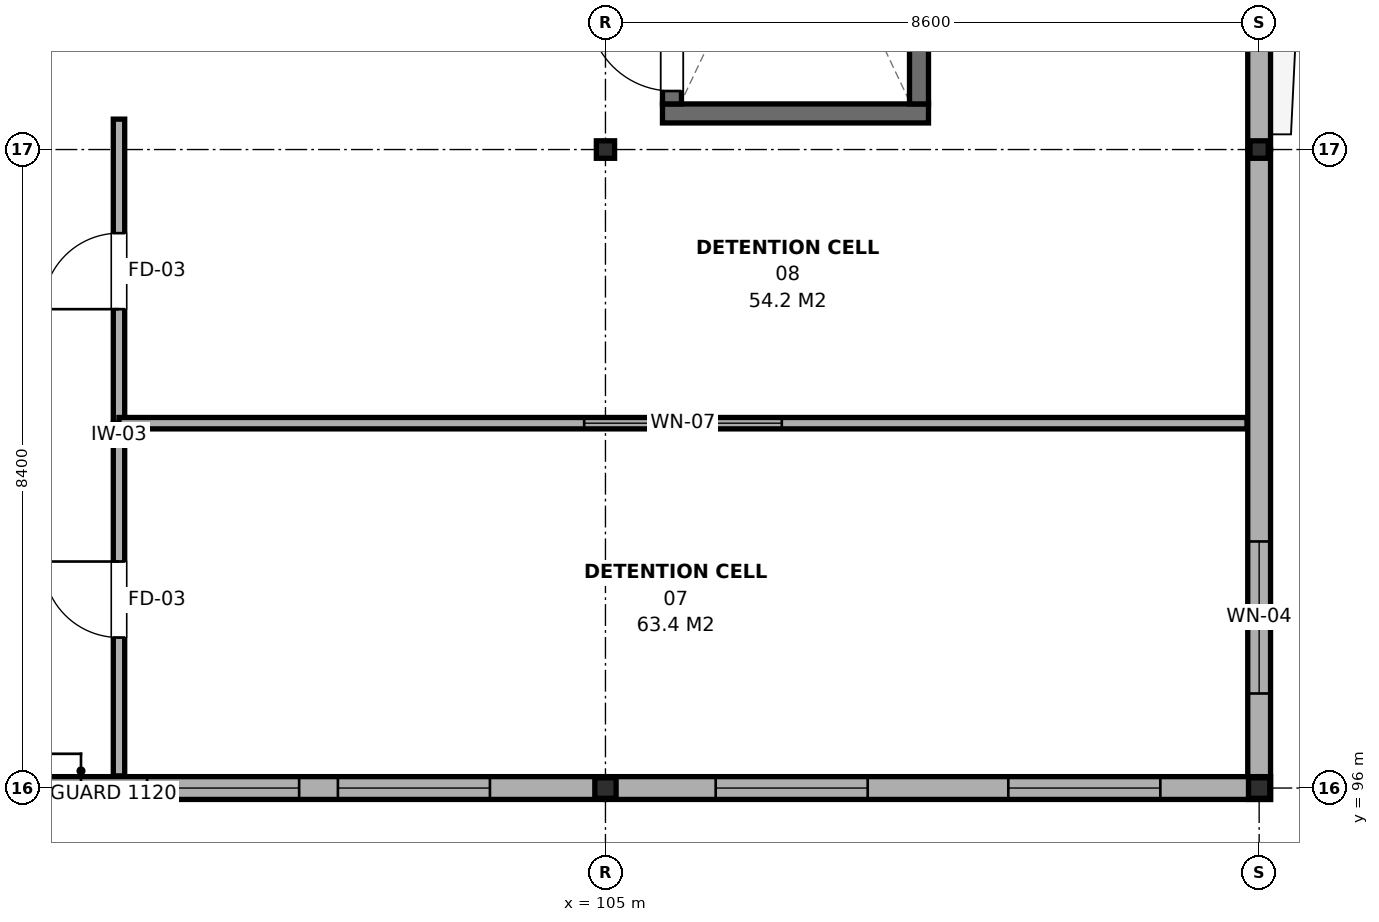
"""IFC4 building model, lengths in metres.
Left out: names, types, materials, properties, quantities, classifications, styles, units other than length and angle.
Written with IfcOpenShell. Run it as: python <this file> out.ifc"""

import sys

from ifc_helpers import new_model, si_unit, direction, frame, frame_2d, origin, origin_2d, place, context, subcontext, project, spatial, rectangle, i_section, extrude, element, fill, save


model = new_model("IFC4")
c1 = context("Model", 3, precision=1e-05, world=origin(), true_north=direction((0.0, 1.0)))
c2 = subcontext(c1, "Body", "Model", "MODEL_VIEW")
j1 = project(units=[si_unit("LENGTHUNIT", "METRE"), si_unit("PLANEANGLEUNIT", "RADIAN")], contexts=[c1])
p1 = place(None, origin())
s1 = spatial("IfcSite", under=j1, at=p1, CompositionType="ELEMENT")
p2 = place(p1, origin())
s2 = spatial("IfcBuilding", under=s1, at=p2, CompositionType="ELEMENT")
p3 = place(p2, frame((0.0, 0.0, 9.0)))
s3 = spatial("IfcBuildingStorey", under=s2, at=p3, CompositionType="ELEMENT", Elevation=9.0)
p4 = place(p3, frame((105.0, 96.0, 0.0), z_axis=(0.0, 0.0, 1.0), x_axis=(1.0, 0.0, 0.0)))
e1 = element("IfcColumn", 1, at=p4, inside=s3, PredefinedType="COLUMN", context=c2, shape_type="SweptSolid", body=[
    extrude(i_section(OverallWidth=0.28, OverallDepth=0.27, WebThickness=0.008, FlangeThickness=0.013, FilletRadius=0.024, at=origin_2d()), origin(), (0.0, 0.0, 1.0), 3.98),
])
p5 = place(p3, frame((105.0, 104.4, 0.0), z_axis=(0.0, 0.0, 1.0), x_axis=(1.0, 0.0, 0.0)))
e2 = element("IfcColumn", 2, at=p5, inside=s3, PredefinedType="COLUMN", context=c2, shape_type="SweptSolid", body=[
    extrude(i_section(OverallWidth=0.24, OverallDepth=0.23, WebThickness=0.008, FlangeThickness=0.012, FilletRadius=0.021, at=origin_2d()), origin(), (0.0, 0.0, 1.0), 3.98),
])
p6 = place(p3, frame((113.6, 96.0, 0.0), z_axis=(0.0, 0.0, 1.0), x_axis=(1.0, 0.0, 0.0)))
e3 = element("IfcColumn", 3, at=p6, inside=s3, PredefinedType="COLUMN", context=c2, shape_type="SweptSolid", body=[
    extrude(i_section(OverallWidth=0.28, OverallDepth=0.27, WebThickness=0.008, FlangeThickness=0.013, FilletRadius=0.024, at=origin_2d()), origin(), (0.0, 0.0, 1.0), 3.98),
])
p7 = place(p3, frame((113.6, 104.4, 0.0), z_axis=(0.0, 0.0, 1.0), x_axis=(1.0, 0.0, 0.0)))
e4 = element("IfcColumn", 4, at=p7, inside=s3, PredefinedType="COLUMN", context=c2, shape_type="SweptSolid", body=[
    extrude(i_section(OverallWidth=0.24, OverallDepth=0.23, WebThickness=0.008, FlangeThickness=0.012, FilletRadius=0.021, at=origin_2d()), origin(), (0.0, 0.0, 1.0), 3.98),
])
p8 = place(p3, frame((105.75, 104.875, 0.0), z_axis=(0.0, 0.0, 1.0), x_axis=(1.0, 0.0, 0.0)))
e5 = element("IfcWall", 5, at=p8, inside=s3, PredefinedType="SHEAR", context=c2, shape_type="SweptSolid", body=[
    extrude(rectangle(XDim=3.5, YDim=0.25, at=frame_2d((1.75, 0.0))), origin(), (0.0, 0.0, 1.0), 3.98),
])
p9 = place(p3, frame((105.875, 105.0, 0.0), z_axis=(0.0, 0.0, 1.0), x_axis=(0.0, 1.0, 0.0)))
e6 = element("IfcWall", 6, at=p9, inside=s3, PredefinedType="SHEAR", context=c2, shape_type="SweptSolid", body=[
    extrude(rectangle(XDim=6.4, YDim=0.25, at=frame_2d((3.2, 0.0))), origin(), (0.0, 0.0, 1.0), 3.98),
])
p10 = place(p9, frame((0.17, 0.0, 0.0)))
e7 = element("IfcOpeningElement", 7, at=p10, cuts=e6, PredefinedType="OPENING", context=c2, shape_type="SweptSolid", body=[
    extrude(rectangle(XDim=1.1, YDim=2.15, at=frame_2d((0.55, 1.075))), frame((0.0, 0.14, 0.0), z_axis=(0.0, -1.0, 0.0), x_axis=(1.0, 0.0, 0.0)), (0.0, 0.0, 1.0), 0.28),
])
p11 = place(p3, frame((109.125, 105.0, 0.0), z_axis=(0.0, 0.0, 1.0), x_axis=(0.0, 1.0, 0.0)))
e8 = element("IfcWall", 8, at=p11, inside=s3, PredefinedType="SHEAR", context=c2, shape_type="SweptSolid", body=[
    extrude(rectangle(XDim=6.4, YDim=0.25, at=frame_2d((3.2, 0.0))), origin(), (0.0, 0.0, 1.0), 3.98),
])
p12 = place(p3, frame((113.6, 95.85, 0.0), z_axis=(0.0, 0.0, 1.0), x_axis=(0.0, 1.0, 0.0)))
e9 = element("IfcWall", 9, at=p12, inside=s3, PredefinedType="SOLIDWALL", context=c2, shape_type="SweptSolid", body=[
    extrude(rectangle(XDim=8.55, YDim=0.3, at=frame_2d((4.275, 0.0))), origin(), (0.0, 0.0, 1.0), 3.485),
])
p13 = place(p12, frame((1.394, 0.0, 1.1)))
e10 = element("IfcOpeningElement", 10, at=p13, cuts=e9, PredefinedType="OPENING", context=c2, shape_type="SweptSolid", body=[
    extrude(rectangle(XDim=2.0, YDim=1.8, at=frame_2d((1.0, 0.9))), frame((0.0, 0.165, 0.0), z_axis=(0.0, -1.0, 0.0), x_axis=(1.0, 0.0, 0.0)), (0.0, 0.0, 1.0), 0.33),
])
p14 = place(p3, frame((113.6, 104.4, 0.0), z_axis=(0.0, 0.0, 1.0), x_axis=(0.0, 1.0, 0.0)))
e11 = element("IfcWall", 11, at=p14, inside=s3, PredefinedType="SOLIDWALL", context=c2, shape_type="SweptSolid", body=[
    extrude(rectangle(XDim=9.0, YDim=0.3, at=frame_2d((4.5, 0.0))), origin(), (0.0, 0.0, 1.0), 3.485),
])
p15 = place(p14, frame((1.52, 0.0, 1.1)))
e12 = element("IfcOpeningElement", 12, at=p15, cuts=e11, PredefinedType="OPENING", context=c2, shape_type="SweptSolid", body=[
    extrude(rectangle(XDim=2.0, YDim=1.8, at=frame_2d((1.0, 0.9))), frame((0.0, 0.165, 0.0), z_axis=(0.0, -1.0, 0.0), x_axis=(1.0, 0.0, 0.0)), (0.0, 0.0, 1.0), 0.33),
])
p16 = place(p14, frame((5.48, 0.0, 1.1)))
e13 = element("IfcOpeningElement", 13, at=p16, cuts=e11, PredefinedType="OPENING", context=c2, shape_type="SweptSolid", body=[
    extrude(rectangle(XDim=2.0, YDim=1.8, at=frame_2d((1.0, 0.9))), frame((0.0, 0.165, 0.0), z_axis=(0.0, -1.0, 0.0), x_axis=(1.0, 0.0, 0.0)), (0.0, 0.0, 1.0), 0.33),
])
p17 = place(p3, frame((96.0, 96.0, 0.0), z_axis=(0.0, 0.0, 1.0), x_axis=(1.0, 0.0, 0.0)))
e14 = element("IfcWall", 14, at=p17, inside=s3, PredefinedType="SOLIDWALL", context=c2, shape_type="SweptSolid", body=[
    extrude(rectangle(XDim=9.0, YDim=0.3, at=frame_2d((4.5, 0.0))), origin(), (0.0, 0.0, 1.0), 3.435),
])
p18 = place(p17, frame((2.97, 0.0, 0.95)))
e15 = element("IfcOpeningElement", 15, at=p18, cuts=e14, PredefinedType="OPENING", context=c2, shape_type="SweptSolid", body=[
    extrude(rectangle(XDim=2.0, YDim=1.8, at=frame_2d((1.0, 0.9))), frame((0.0, 0.165, 0.0), z_axis=(0.0, -1.0, 0.0), x_axis=(1.0, 0.0, 0.0)), (0.0, 0.0, 1.0), 0.33),
])
p19 = place(p17, frame((5.48, 0.0, 0.95)))
e16 = element("IfcOpeningElement", 16, at=p19, cuts=e14, PredefinedType="OPENING", context=c2, shape_type="SweptSolid", body=[
    extrude(rectangle(XDim=2.0, YDim=1.8, at=frame_2d((1.0, 0.9))), frame((0.0, 0.165, 0.0), z_axis=(0.0, -1.0, 0.0), x_axis=(1.0, 0.0, 0.0)), (0.0, 0.0, 1.0), 0.33),
])
p20 = place(p3, frame((105.0, 96.0, 0.0), z_axis=(0.0, 0.0, 1.0), x_axis=(1.0, 0.0, 0.0)))
e17 = element("IfcWall", 17, at=p20, inside=s3, PredefinedType="SOLIDWALL", context=c2, shape_type="SweptSolid", body=[
    extrude(rectangle(XDim=8.75, YDim=0.3, at=frame_2d((4.375, 0.0))), origin(), (0.0, 0.0, 1.0), 3.485),
])
p21 = place(p20, frame((1.45, 0.0, 0.95)))
e18 = element("IfcOpeningElement", 18, at=p21, cuts=e17, PredefinedType="OPENING", context=c2, shape_type="SweptSolid", body=[
    extrude(rectangle(XDim=2.0, YDim=1.8, at=frame_2d((1.0, 0.9))), frame((0.0, 0.165, 0.0), z_axis=(0.0, -1.0, 0.0), x_axis=(1.0, 0.0, 0.0)), (0.0, 0.0, 1.0), 0.33),
])
p22 = place(p20, frame((5.3, 0.0, 0.95)))
e19 = element("IfcOpeningElement", 19, at=p22, cuts=e17, PredefinedType="OPENING", context=c2, shape_type="SweptSolid", body=[
    extrude(rectangle(XDim=2.0, YDim=1.8, at=frame_2d((1.0, 0.9))), frame((0.0, 0.165, 0.0), z_axis=(0.0, -1.0, 0.0), x_axis=(1.0, 0.0, 0.0)), (0.0, 0.0, 1.0), 0.33),
])
p23 = place(p3, frame((98.6, 96.16, 0.0), z_axis=(0.0, 0.0, 1.0), x_axis=(0.0, 1.0, 0.0)))
e20 = element("IfcWall", 20, at=p23, inside=s3, PredefinedType="PARTITIONING", context=c2, shape_type="SweptSolid", body=[
    extrude(rectangle(XDim=4.64, YDim=0.15, at=frame_2d((2.32, 0.0))), origin(), (0.0, 0.0, 1.0), 3.485),
])
p24 = place(p23, frame((1.82, 0.0, 0.0)))
e21 = element("IfcOpeningElement", 21, at=p24, cuts=e20, PredefinedType="OPENING", context=c2, shape_type="SweptSolid", body=[
    extrude(rectangle(XDim=1.0, YDim=2.15, at=frame_2d((0.5, 1.075))), frame((0.0, 0.09, 0.0), z_axis=(0.0, -1.0, 0.0), x_axis=(1.0, 0.0, 0.0)), (0.0, 0.0, 1.0), 0.18),
])
p25 = place(p3, frame((98.6, 100.8, 0.0), z_axis=(0.0, 0.0, 1.0), x_axis=(0.0, 1.0, 0.0)))
e22 = element("IfcWall", 22, at=p25, inside=s3, PredefinedType="PARTITIONING", context=c2, shape_type="SweptSolid", body=[
    extrude(rectangle(XDim=4.0, YDim=0.15, at=frame_2d((2.0, 0.0))), origin(), (0.0, 0.0, 1.0), 3.585),
])
p26 = place(p25, frame((1.5, 0.0, 0.0)))
e23 = element("IfcOpeningElement", 23, at=p26, cuts=e22, PredefinedType="OPENING", context=c2, shape_type="SweptSolid", body=[
    extrude(rectangle(XDim=1.0, YDim=2.15, at=frame_2d((0.5, 1.075))), frame((0.0, 0.09, 0.0), z_axis=(0.0, -1.0, 0.0), x_axis=(1.0, 0.0, 0.0)), (0.0, 0.0, 1.0), 0.18),
])
p27 = place(p3, frame((98.6, 100.8, 0.0), z_axis=(0.0, 0.0, 1.0), x_axis=(1.0, 0.0, 0.0)))
e24 = element("IfcWall", 24, at=p27, inside=s3, PredefinedType="PARTITIONING", context=c2, shape_type="SweptSolid", body=[
    extrude(rectangle(XDim=14.84, YDim=0.15, at=frame_2d((7.42, 0.0))), origin(), (0.0, 0.0, 1.0), 3.485),
])
p28 = place(p27, frame((6.12, 0.0, 0.95)))
e25 = element("IfcOpeningElement", 25, at=p28, cuts=e24, PredefinedType="OPENING", context=c2, shape_type="SweptSolid", body=[
    extrude(rectangle(XDim=2.6, YDim=1.5, at=frame_2d((1.3, 0.75))), frame((0.0, 0.09, 0.0), z_axis=(0.0, -1.0, 0.0), x_axis=(1.0, 0.0, 0.0)), (0.0, 0.0, 1.0), 0.18),
])
p29 = place(p13, origin())
e26 = element("IfcWindow", 26, at=p29, inside=s3, PartitioningType="SINGLE_PANEL", PredefinedType="WINDOW", context=c2, shape_type="SweptSolid", body=[
    extrude(rectangle(XDim=2.0, YDim=1.8, at=frame_2d((1.0, 0.9))), frame((0.0, 0.03, 0.0), z_axis=(0.0, -1.0, 0.0), x_axis=(1.0, 0.0, 0.0)), (0.0, 0.0, 1.0), 0.06),
])
fill(e10, e26)
p30 = place(p18, origin())
e27 = element("IfcWindow", 27, at=p30, inside=s3, PartitioningType="SINGLE_PANEL", PredefinedType="WINDOW", context=c2, shape_type="SweptSolid", body=[
    extrude(rectangle(XDim=2.0, YDim=1.8, at=frame_2d((1.0, 0.9))), frame((0.0, 0.03, 0.0), z_axis=(0.0, -1.0, 0.0), x_axis=(1.0, 0.0, 0.0)), (0.0, 0.0, 1.0), 0.06),
])
fill(e15, e27)
p31 = place(p19, origin())
e28 = element("IfcWindow", 28, at=p31, inside=s3, PartitioningType="SINGLE_PANEL", PredefinedType="WINDOW", context=c2, shape_type="SweptSolid", body=[
    extrude(rectangle(XDim=2.0, YDim=1.8, at=frame_2d((1.0, 0.9))), frame((0.0, 0.03, 0.0), z_axis=(0.0, -1.0, 0.0), x_axis=(1.0, 0.0, 0.0)), (0.0, 0.0, 1.0), 0.06),
])
fill(e16, e28)
p32 = place(p21, origin())
e29 = element("IfcWindow", 29, at=p32, inside=s3, PartitioningType="SINGLE_PANEL", PredefinedType="WINDOW", context=c2, shape_type="SweptSolid", body=[
    extrude(rectangle(XDim=2.0, YDim=1.8, at=frame_2d((1.0, 0.9))), frame((0.0, 0.03, 0.0), z_axis=(0.0, -1.0, 0.0), x_axis=(1.0, 0.0, 0.0)), (0.0, 0.0, 1.0), 0.06),
])
fill(e18, e29)
p33 = place(p22, origin())
e30 = element("IfcWindow", 30, at=p33, inside=s3, PartitioningType="SINGLE_PANEL", PredefinedType="WINDOW", context=c2, shape_type="SweptSolid", body=[
    extrude(rectangle(XDim=2.0, YDim=1.8, at=frame_2d((1.0, 0.9))), frame((0.0, 0.03, 0.0), z_axis=(0.0, -1.0, 0.0), x_axis=(1.0, 0.0, 0.0)), (0.0, 0.0, 1.0), 0.06),
])
fill(e19, e30)
p34 = place(p10, origin())
e31 = element("IfcDoor", 31, at=p34, inside=s3, OperationType="SINGLE_SWING_RIGHT", PredefinedType="DOOR", context=c2, shape_type="SweptSolid", body=[
    extrude(rectangle(XDim=1.1, YDim=2.15, at=frame_2d((0.55, 1.075))), frame((0.0, 0.025, 0.0), z_axis=(0.0, -1.0, 0.0), x_axis=(1.0, 0.0, 0.0)), (0.0, 0.0, 1.0), 0.05),
])
fill(e7, e31)
p35 = place(p24, origin())
e32 = element("IfcDoor", 32, at=p35, inside=s3, OperationType="SINGLE_SWING_RIGHT", PredefinedType="DOOR", context=c2, shape_type="SweptSolid", body=[
    extrude(rectangle(XDim=1.0, YDim=2.15, at=frame_2d((0.5, 1.075))), frame((0.0, 0.025, 0.0), z_axis=(0.0, -1.0, 0.0), x_axis=(1.0, 0.0, 0.0)), (0.0, 0.0, 1.0), 0.05),
])
fill(e21, e32)
p36 = place(p26, origin())
e33 = element("IfcDoor", 33, at=p36, inside=s3, OperationType="SINGLE_SWING_LEFT", PredefinedType="DOOR", context=c2, shape_type="SweptSolid", body=[
    extrude(rectangle(XDim=1.0, YDim=2.15, at=frame_2d((0.5, 1.075))), frame((0.0, 0.025, 0.0), z_axis=(0.0, -1.0, 0.0), x_axis=(1.0, 0.0, 0.0)), (0.0, 0.0, 1.0), 0.05),
])
fill(e23, e33)
p37 = place(p28, origin())
e34 = element("IfcWindow", 34, at=p37, inside=s3, PartitioningType="SINGLE_PANEL", PredefinedType="WINDOW", context=c2, shape_type="SweptSolid", body=[
    extrude(rectangle(XDim=2.6, YDim=1.5, at=frame_2d((1.3, 0.75))), frame((0.0, 0.03, 0.0), z_axis=(0.0, -1.0, 0.0), x_axis=(1.0, 0.0, 0.0)), (0.0, 0.0, 1.0), 0.06),
])
fill(e25, e34)
save(model, sys.argv[1])
